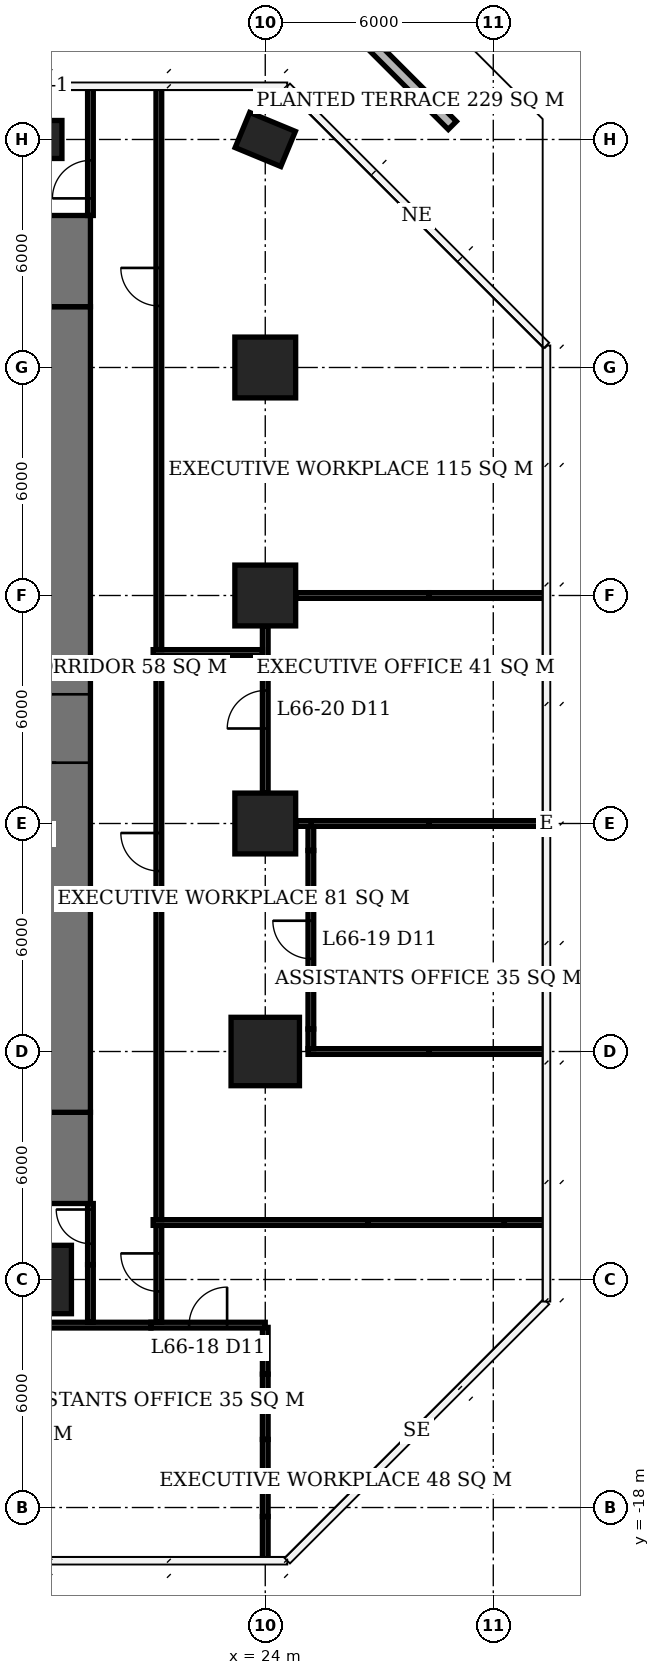
"""IFC4 building model, lengths in metres.
Left out: names, types, materials, properties, quantities, classifications, styles, units other than length and angle.
Written with IfcOpenShell. Run it as: python <this file> out.ifc"""

import sys

from ifc_helpers import new_model, si_unit, direction, frame, frame_2d, origin, origin_2d, place, context, subcontext, project, spatial, rectangle, extrude, element, fill, save


model = new_model("IFC4")
c1 = context("Model", 3, precision=1e-05, world=origin(), true_north=direction((0.0, 1.0)))
c2 = subcontext(c1, "Body", "Model", "MODEL_VIEW")
j1 = project(units=[si_unit("LENGTHUNIT", "METRE"), si_unit("PLANEANGLEUNIT", "RADIAN")], contexts=[c1])
p1 = place(None, origin())
s1 = spatial("IfcSite", under=j1, at=p1, CompositionType="ELEMENT")
p2 = place(p1, origin())
s2 = spatial("IfcBuilding", under=s1, at=p2, CompositionType="ELEMENT")
p3 = place(p2, frame((0.0, 0.0, 268.4)))
s3 = spatial("IfcBuildingStorey", under=s2, at=p3, CompositionType="ELEMENT", Elevation=268.4)
p4 = place(p3, frame((18.0, -12.0, 0.0), z_axis=(0.0, 0.0, 1.0), x_axis=(1.0, 0.0, 0.0)))
e1 = element("IfcColumn", 1, at=p4, inside=s3, PredefinedType="COLUMN", context=c2, shape_type="SweptSolid", body=[
    extrude(rectangle(XDim=1.8, YDim=1.8, at=origin_2d()), origin(), (0.0, 0.0, 1.0), 3.9),
])
p5 = place(p3, frame((18.0, 18.0, 0.0), z_axis=(0.0, 0.0, 1.0), x_axis=(1.0, 0.0, 0.0)))
e2 = element("IfcColumn", 2, at=p5, inside=s3, PredefinedType="COLUMN", context=c2, shape_type="SweptSolid", body=[
    extrude(rectangle(XDim=1.3, YDim=1.0, at=origin_2d()), origin(), (0.0, 0.0, 1.0), 3.9),
])
p6 = place(p3, frame((24.0, -6.0, 0.0), z_axis=(0.0, 0.0, 1.0), x_axis=(1.0, 0.0, 0.0)))
e3 = element("IfcColumn", 3, at=p6, inside=s3, PredefinedType="COLUMN", context=c2, shape_type="SweptSolid", body=[
    extrude(rectangle(XDim=1.8, YDim=1.8, at=origin_2d()), origin(), (0.0, 0.0, 1.0), 3.9),
])
for number, where, z_axis, x_axis in (
    (4, (24.0, 0.0, 0.0), (0.0, 0.0, 1.0), (1.0, 0.0, 0.0)),
    (5, (24.0, 6.0, 0.0), (0.0, 0.0, 1.0), (1.0, 0.0, 0.0)),
    (6, (24.0, 12.0, 0.0), (0.0, 0.0, 1.0), (1.0, 0.0, 0.0)),
):
    element("IfcColumn", number, at=place(p3, frame(where, z_axis=z_axis, x_axis=x_axis)), inside=s3, PredefinedType="COLUMN", context=c2, shape_type="SweptSolid", body=[
        extrude(rectangle(XDim=1.6, YDim=1.6, at=origin_2d()), origin(), (0.0, 0.0, 1.0), 3.9),
    ])
p7 = place(p3, frame((24.0, 18.0, 0.0), z_axis=(0.0, 0.0, 1.0), x_axis=(0.923879532511, -0.382683432365, 0.0)))
e7 = element("IfcColumn", 7, at=p7, inside=s3, PredefinedType="COLUMN", context=c2, shape_type="SweptSolid", body=[
    extrude(rectangle(XDim=1.3, YDim=1.0, at=origin_2d()), origin(), (0.0, 0.0, 1.0), 3.9),
])
p8 = place(p3, frame((18.5, -7.6, 0.0), z_axis=(0.0, 0.0, 1.0), x_axis=(0.0, 1.0, 0.0)))
e8 = element("IfcWall", 8, at=p8, inside=s3, PredefinedType="SHEAR", context=c2, shape_type="SweptSolid", body=[
    extrude(rectangle(XDim=21.2, YDim=1.8, at=frame_2d((10.6, 0.0))), origin(), (0.0, 0.0, 1.0), 3.9),
])
p9 = place(p8, frame((9.2, 0.0, 0.0)))
e9 = element("IfcOpeningElement", 9, at=p9, cuts=e8, PredefinedType="OPENING", context=c2, shape_type="SweptSolid", body=[
    extrude(rectangle(XDim=1.8, YDim=2.4, at=frame_2d((0.9, 1.2))), frame((0.0, 0.91, 0.0), z_axis=(0.0, -1.0, 0.0), x_axis=(1.0, 0.0, 0.0)), (0.0, 0.0, 1.0), 1.82),
])
for number, where, z_axis, x_axis in (
    (10, (18.5, -10.0, 0.0), (0.0, 0.0, 1.0), (0.0, 1.0, 0.0)),
    (11, (18.5, 13.6, 0.0), (0.0, 0.0, 1.0), (0.0, 1.0, 0.0)),
):
    element("IfcWall", number, at=place(p3, frame(where, z_axis=z_axis, x_axis=x_axis)), inside=s3, PredefinedType="SHEAR", context=c2, shape_type="SweptSolid", body=[
        extrude(rectangle(XDim=2.4, YDim=1.8, at=frame_2d((1.2, 0.0))), origin(), (0.0, 0.0, 1.0), 3.9),
    ])
p10 = place(p3, frame((24.37, 22.923, 0.0), z_axis=(0.0, 0.0, 1.0), x_axis=(0.707106781187, -0.707106781187, 0.0)))
e12 = element("IfcWall", 12, at=p10, inside=s3, PredefinedType="USERDEFINED", context=c2, shape_type="SweptSolid", body=[
    extrude(rectangle(XDim=6.438, YDim=0.3, at=frame_2d((3.219, 0.0))), origin(), (0.0, 0.0, 1.0), 0.6),
])
p11 = place(p3, frame((17.925, -13.2, 0.0), z_axis=(0.0, 0.0, 1.0), x_axis=(1.0, 0.0, 0.0)))
e13 = element("IfcWall", 13, at=p11, inside=s3, PredefinedType="PARTITIONING", context=c2, shape_type="SweptSolid", body=[
    extrude(rectangle(XDim=3.067, YDim=0.15, at=frame_2d((1.534, 0.0))), origin(), (0.0, 0.0, 1.0), 2.65),
])
p12 = place(p3, frame((20.992, -13.2, 0.0), z_axis=(0.0, 0.0, 1.0), x_axis=(1.0, 0.0, 0.0)))
e14 = element("IfcWall", 14, at=p12, inside=s3, PredefinedType="PARTITIONING", context=c2, shape_type="SweptSolid", body=[
    extrude(rectangle(XDim=3.008, YDim=0.15, at=frame_2d((1.504, 0.0))), origin(), (0.0, 0.0, 1.0), 3.65),
])
p13 = place(p12, frame((1.004, 0.0, 0.0)))
e15 = element("IfcOpeningElement", 15, at=p13, cuts=e14, PredefinedType="OPENING", context=c2, shape_type="SweptSolid", body=[
    extrude(rectangle(XDim=1.0, YDim=2.4, at=frame_2d((0.5, 1.2))), frame((0.0, 0.085, 0.0), z_axis=(0.0, -1.0, 0.0), x_axis=(1.0, 0.0, 0.0)), (0.0, 0.0, 1.0), 0.17),
])
p14 = place(p3, frame((25.125, -6.0, 0.0), z_axis=(0.0, 0.0, 1.0), x_axis=(1.0, 0.0, 0.0)))
e16 = element("IfcWall", 16, at=p14, inside=s3, PredefinedType="PARTITIONING", context=c2, shape_type="SweptSolid", body=[
    extrude(rectangle(XDim=3.185, YDim=0.15, at=frame_2d((1.593, 0.0))), origin(), (0.0, 0.0, 1.0), 2.65),
])
p15 = place(p3, frame((28.31, -6.0, 0.0), z_axis=(0.0, 0.0, 1.0), x_axis=(1.0, 0.0, 0.0)))
e17 = element("IfcWall", 17, at=p15, inside=s3, PredefinedType="PARTITIONING", context=c2, shape_type="SweptSolid", body=[
    extrude(rectangle(XDim=3.065, YDim=0.15, at=frame_2d((1.532, 0.0))), origin(), (0.0, 0.0, 1.0), 3.65),
])
p16 = place(p3, frame((24.8, 0.0, 0.0), z_axis=(0.0, 0.0, 1.0), x_axis=(1.0, 0.0, 0.0)))
e18 = element("IfcWall", 18, at=p16, inside=s3, PredefinedType="PARTITIONING", context=c2, shape_type="SweptSolid", body=[
    extrude(rectangle(XDim=0.475, YDim=0.15, at=frame_2d((0.237, 0.0))), origin(), (0.0, 0.0, 1.0), 2.65),
])
p17 = place(p3, frame((25.2, 0.0, 0.0), z_axis=(0.0, 0.0, 1.0), x_axis=(1.0, 0.0, 0.0)))
e19 = element("IfcWall", 19, at=p17, inside=s3, PredefinedType="PARTITIONING", context=c2, shape_type="SweptSolid", body=[
    extrude(rectangle(XDim=3.11, YDim=0.15, at=frame_2d((1.555, 0.0))), origin(), (0.0, 0.0, 1.0), 2.65),
])
p18 = place(p3, frame((28.31, 0.0, 0.0), z_axis=(0.0, 0.0, 1.0), x_axis=(1.0, 0.0, 0.0)))
e20 = element("IfcWall", 20, at=p18, inside=s3, PredefinedType="PARTITIONING", context=c2, shape_type="SweptSolid", body=[
    extrude(rectangle(XDim=3.04, YDim=0.15, at=frame_2d((1.52, 0.0))), origin(), (0.0, 0.0, 1.0), 3.65),
])
p19 = place(p3, frame((24.8, 6.0, 0.0), z_axis=(0.0, 0.0, 1.0), x_axis=(1.0, 0.0, 0.0)))
e21 = element("IfcWall", 21, at=p19, inside=s3, PredefinedType="PARTITIONING", context=c2, shape_type="SweptSolid", body=[
    extrude(rectangle(XDim=3.51, YDim=0.15, at=frame_2d((1.755, 0.0))), origin(), (0.0, 0.0, 1.0), 2.65),
])
p20 = place(p3, frame((28.31, 6.0, 0.0), z_axis=(0.0, 0.0, 1.0), x_axis=(1.0, 0.0, 0.0)))
e22 = element("IfcWall", 22, at=p20, inside=s3, PredefinedType="PARTITIONING", context=c2, shape_type="SweptSolid", body=[
    extrude(rectangle(XDim=3.065, YDim=0.15, at=frame_2d((1.532, 0.0))), origin(), (0.0, 0.0, 1.0), 3.65),
])
p21 = place(p3, frame((24.0, -19.375, 0.0), z_axis=(0.0, 0.0, 1.0), x_axis=(0.0, 1.0, 0.0)))
e23 = element("IfcWall", 23, at=p21, inside=s3, PredefinedType="PARTITIONING", context=c2, shape_type="SweptSolid", body=[
    extrude(rectangle(XDim=1.138, YDim=0.15, at=frame_2d((0.569, 0.0))), origin(), (0.0, 0.0, 1.0), 3.65),
])
p22 = place(p3, frame((24.0, -18.237, 0.0), z_axis=(0.0, 0.0, 1.0), x_axis=(0.0, 1.0, 0.0)))
e24 = element("IfcWall", 24, at=p22, inside=s3, PredefinedType="PARTITIONING", context=c2, shape_type="SweptSolid", body=[
    extrude(rectangle(XDim=2.029, YDim=0.15, at=frame_2d((1.015, 0.0))), origin(), (0.0, 0.0, 1.0), 2.65),
])
p23 = place(p3, frame((24.0, -16.208, 0.0), z_axis=(0.0, 0.0, 1.0), x_axis=(0.0, 1.0, 0.0)))
e25 = element("IfcWall", 25, at=p23, inside=s3, PredefinedType="PARTITIONING", context=c2, shape_type="SweptSolid", body=[
    extrude(rectangle(XDim=1.718, YDim=0.15, at=frame_2d((0.859, 0.0))), origin(), (0.0, 0.0, 1.0), 3.65),
])
p24 = place(p3, frame((24.0, -14.49, 0.0), z_axis=(0.0, 0.0, 1.0), x_axis=(0.0, 1.0, 0.0)))
e26 = element("IfcWall", 26, at=p24, inside=s3, PredefinedType="PARTITIONING", context=c2, shape_type="SweptSolid", body=[
    extrude(rectangle(XDim=1.23, YDim=0.15, at=frame_2d((0.615, 0.0))), origin(), (0.0, 0.0, 1.0), 2.65),
])
p25 = place(p3, frame((24.0, 0.8, 0.0), z_axis=(0.0, 0.0, 1.0), x_axis=(0.0, 1.0, 0.0)))
e27 = element("IfcWall", 27, at=p25, inside=s3, PredefinedType="PARTITIONING", context=c2, shape_type="SweptSolid", body=[
    extrude(rectangle(XDim=4.4, YDim=0.15, at=frame_2d((2.2, 0.0))), origin(), (0.0, 0.0, 1.0), 3.65),
])
p26 = place(p25, frame((1.7, 0.0, 0.0)))
e28 = element("IfcOpeningElement", 28, at=p26, cuts=e27, PredefinedType="OPENING", context=c2, shape_type="SweptSolid", body=[
    extrude(rectangle(XDim=1.0, YDim=2.4, at=frame_2d((0.5, 1.2))), frame((0.0, 0.085, 0.0), z_axis=(0.0, -1.0, 0.0), x_axis=(1.0, 0.0, 0.0)), (0.0, 0.0, 1.0), 0.17),
])
p27 = place(p3, frame((25.2, -5.925, 0.0), z_axis=(0.0, 0.0, 1.0), x_axis=(0.0, 1.0, 0.0)))
e29 = element("IfcWall", 29, at=p27, inside=s3, PredefinedType="PARTITIONING", context=c2, shape_type="SweptSolid", body=[
    extrude(rectangle(XDim=0.517, YDim=0.15, at=frame_2d((0.259, 0.0))), origin(), (0.0, 0.0, 1.0), 2.65),
])
p28 = place(p3, frame((25.2, -5.408, 0.0), z_axis=(0.0, 0.0, 1.0), x_axis=(0.0, 1.0, 0.0)))
e30 = element("IfcWall", 30, at=p28, inside=s3, PredefinedType="PARTITIONING", context=c2, shape_type="SweptSolid", body=[
    extrude(rectangle(XDim=4.698, YDim=0.15, at=frame_2d((2.349, 0.0))), origin(), (0.0, 0.0, 1.0), 3.65),
])
p29 = place(p28, frame((1.849, 0.0, 0.0)))
e31 = element("IfcOpeningElement", 31, at=p29, cuts=e30, PredefinedType="OPENING", context=c2, shape_type="SweptSolid", body=[
    extrude(rectangle(XDim=1.0, YDim=2.4, at=frame_2d((0.5, 1.2))), frame((0.0, 0.085, 0.0), z_axis=(0.0, -1.0, 0.0), x_axis=(1.0, 0.0, 0.0)), (0.0, 0.0, 1.0), 0.17),
])
p30 = place(p3, frame((25.2, -0.71, 0.0), z_axis=(0.0, 0.0, 1.0), x_axis=(0.0, 1.0, 0.0)))
e32 = element("IfcWall", 32, at=p30, inside=s3, PredefinedType="PARTITIONING", context=c2, shape_type="SweptSolid", body=[
    extrude(rectangle(XDim=0.635, YDim=0.15, at=frame_2d((0.317, 0.0))), origin(), (0.0, 0.0, 1.0), 2.65),
])
p31 = place(p3, frame((19.4, -13.125, 0.0), z_axis=(0.0, 0.0, 1.0), x_axis=(0.0, 1.0, 0.0)))
e33 = element("IfcWall", 33, at=p31, inside=s3, PredefinedType="PARTITIONING", context=c2, shape_type="SweptSolid", body=[
    extrude(rectangle(XDim=1.517, YDim=0.15, at=frame_2d((0.759, 0.0))), origin(), (0.0, 0.0, 1.0), 2.65),
])
p32 = place(p3, frame((19.4, -11.608, 0.0), z_axis=(0.0, 0.0, 1.0), x_axis=(0.0, 1.0, 0.0)))
e34 = element("IfcWall", 34, at=p32, inside=s3, PredefinedType="PARTITIONING", context=c2, shape_type="SweptSolid", body=[
    extrude(rectangle(XDim=1.608, YDim=0.15, at=frame_2d((0.804, 0.0))), origin(), (0.0, 0.0, 1.0), 3.65),
])
p33 = place(p32, frame((0.55, 0.0, 0.0)))
e35 = element("IfcOpeningElement", 35, at=p33, cuts=e34, PredefinedType="OPENING", context=c2, shape_type="SweptSolid", body=[
    extrude(rectangle(XDim=0.9, YDim=2.1, at=frame_2d((0.45, 1.05))), frame((0.0, 0.085, 0.0), z_axis=(0.0, -1.0, 0.0), x_axis=(1.0, 0.0, 0.0)), (0.0, 0.0, 1.0), 0.17),
])
p34 = place(p3, frame((19.4, 16.0, 0.0), z_axis=(0.0, 0.0, 1.0), x_axis=(0.0, 1.0, 0.0)))
e36 = element("IfcWall", 36, at=p34, inside=s3, PredefinedType="PARTITIONING", context=c2, shape_type="SweptSolid", body=[
    extrude(rectangle(XDim=3.375, YDim=0.15, at=frame_2d((1.688, 0.0))), origin(), (0.0, 0.0, 1.0), 3.65),
])
p35 = place(p34, frame((0.45, 0.0, 0.0)))
e37 = element("IfcOpeningElement", 37, at=p35, cuts=e36, PredefinedType="OPENING", context=c2, shape_type="SweptSolid", body=[
    extrude(rectangle(XDim=1.0, YDim=2.1, at=frame_2d((0.5, 1.05))), frame((0.0, 0.085, 0.0), z_axis=(0.0, -1.0, 0.0), x_axis=(1.0, 0.0, 0.0)), (0.0, 0.0, 1.0), 0.17),
])
p36 = place(p3, frame((21.2, -13.125, 0.0), z_axis=(0.0, 0.0, 1.0), x_axis=(0.0, 1.0, 0.0)))
e38 = element("IfcWall", 38, at=p36, inside=s3, PredefinedType="PARTITIONING", context=c2, shape_type="SweptSolid", body=[
    extrude(rectangle(XDim=2.55, YDim=0.15, at=frame_2d((1.275, 0.0))), origin(), (0.0, 0.0, 1.0), 3.65),
])
p37 = place(p36, frame((0.812, 0.0, 0.0)))
e39 = element("IfcOpeningElement", 39, at=p37, cuts=e38, PredefinedType="OPENING", context=c2, shape_type="SweptSolid", body=[
    extrude(rectangle(XDim=1.0, YDim=2.4, at=frame_2d((0.5, 1.2))), frame((0.0, 0.085, 0.0), z_axis=(0.0, -1.0, 0.0), x_axis=(1.0, 0.0, 0.0)), (0.0, 0.0, 1.0), 0.17),
])
p38 = place(p3, frame((21.2, -10.425, 0.0), z_axis=(0.0, 0.0, 1.0), x_axis=(0.0, 1.0, 0.0)))
e40 = element("IfcWall", 40, at=p38, inside=s3, PredefinedType="PARTITIONING", context=c2, shape_type="SweptSolid", body=[
    extrude(rectangle(XDim=14.85, YDim=0.15, at=frame_2d((7.425, 0.0))), origin(), (0.0, 0.0, 1.0), 3.65),
])
p39 = place(p38, frame((9.175, 0.0, 0.0)))
e41 = element("IfcOpeningElement", 41, at=p39, cuts=e40, PredefinedType="OPENING", context=c2, shape_type="SweptSolid", body=[
    extrude(rectangle(XDim=1.0, YDim=2.4, at=frame_2d((0.5, 1.2))), frame((0.0, 0.085, 0.0), z_axis=(0.0, -1.0, 0.0), x_axis=(1.0, 0.0, 0.0)), (0.0, 0.0, 1.0), 0.17),
])
p40 = place(p3, frame((21.05, -10.5, 0.0), z_axis=(0.0, 0.0, 1.0), x_axis=(1.0, 0.0, 0.0)))
e42 = element("IfcWall", 42, at=p40, inside=s3, PredefinedType="PARTITIONING", context=c2, shape_type="SweptSolid", body=[
    extrude(rectangle(XDim=5.658, YDim=0.15, at=frame_2d((2.829, 0.0))), origin(), (0.0, 0.0, 1.0), 3.65),
])
p41 = place(p3, frame((26.708, -10.5, 0.0), z_axis=(0.0, 0.0, 1.0), x_axis=(1.0, 0.0, 0.0)))
e43 = element("IfcWall", 43, at=p41, inside=s3, PredefinedType="PARTITIONING", context=c2, shape_type="SweptSolid", body=[
    extrude(rectangle(XDim=3.584, YDim=0.15, at=frame_2d((1.792, 0.0))), origin(), (0.0, 0.0, 1.0), 2.65),
])
p42 = place(p3, frame((30.292, -10.5, 0.0), z_axis=(0.0, 0.0, 1.0), x_axis=(1.0, 0.0, 0.0)))
e44 = element("IfcWall", 44, at=p42, inside=s3, PredefinedType="PARTITIONING", context=c2, shape_type="SweptSolid", body=[
    extrude(rectangle(XDim=1.083, YDim=0.15, at=frame_2d((0.542, 0.0))), origin(), (0.0, 0.0, 1.0), 3.65),
])
p43 = place(p3, frame((21.2, 4.575, 0.0), z_axis=(0.0, 0.0, 1.0), x_axis=(0.0, 1.0, 0.0)))
e45 = element("IfcWall", 45, at=p43, inside=s3, PredefinedType="PARTITIONING", context=c2, shape_type="SweptSolid", body=[
    extrude(rectangle(XDim=14.8, YDim=0.15, at=frame_2d((7.4, 0.0))), origin(), (0.0, 0.0, 1.0), 3.65),
])
p44 = place(p43, frame((9.045, 0.0, 0.0)))
e46 = element("IfcOpeningElement", 46, at=p44, cuts=e45, PredefinedType="OPENING", context=c2, shape_type="SweptSolid", body=[
    extrude(rectangle(XDim=1.0, YDim=2.4, at=frame_2d((0.5, 1.2))), frame((0.0, 0.085, 0.0), z_axis=(0.0, -1.0, 0.0), x_axis=(1.0, 0.0, 0.0)), (0.0, 0.0, 1.0), 0.17),
])
p45 = place(p3, frame((21.05, 4.5, 0.0), z_axis=(0.0, 0.0, 1.0), x_axis=(1.0, 0.0, 0.0)))
e47 = element("IfcWall", 47, at=p45, inside=s3, PredefinedType="PARTITIONING", context=c2, shape_type="SweptSolid", body=[
    extrude(rectangle(XDim=2.875, YDim=0.15, at=frame_2d((1.438, 0.0))), origin(), (0.0, 0.0, 1.0), 3.65),
])
p46 = place(p9, origin())
e48 = element("IfcDoor", 48, at=p46, inside=s3, OperationType="DOUBLE_DOOR_SINGLE_SWING", PredefinedType="DOOR", context=c2, shape_type="SweptSolid", body=[
    extrude(rectangle(XDim=1.8, YDim=2.4, at=frame_2d((0.9, 1.2))), frame((0.0, 0.025, 0.0), z_axis=(0.0, -1.0, 0.0), x_axis=(1.0, 0.0, 0.0)), (0.0, 0.0, 1.0), 0.05),
])
fill(e9, e48)
p47 = place(p13, origin())
e49 = element("IfcDoor", 49, at=p47, inside=s3, OperationType="SINGLE_SWING_RIGHT", PredefinedType="DOOR", context=c2, shape_type="SweptSolid", body=[
    extrude(rectangle(XDim=1.0, YDim=2.4, at=frame_2d((0.5, 1.2))), frame((0.0, 0.025, 0.0), z_axis=(0.0, -1.0, 0.0), x_axis=(1.0, 0.0, 0.0)), (0.0, 0.0, 1.0), 0.05),
])
fill(e15, e49)
p48 = place(p29, origin())
e50 = element("IfcDoor", 50, at=p48, inside=s3, OperationType="SINGLE_SWING_RIGHT", PredefinedType="DOOR", context=c2, shape_type="SweptSolid", body=[
    extrude(rectangle(XDim=1.0, YDim=2.4, at=frame_2d((0.5, 1.2))), frame((0.0, 0.025, 0.0), z_axis=(0.0, -1.0, 0.0), x_axis=(1.0, 0.0, 0.0)), (0.0, 0.0, 1.0), 0.05),
])
fill(e31, e50)
p49 = place(p26, origin())
e51 = element("IfcDoor", 51, at=p49, inside=s3, OperationType="SINGLE_SWING_LEFT", PredefinedType="DOOR", context=c2, shape_type="SweptSolid", body=[
    extrude(rectangle(XDim=1.0, YDim=2.4, at=frame_2d((0.5, 1.2))), frame((0.0, 0.025, 0.0), z_axis=(0.0, -1.0, 0.0), x_axis=(1.0, 0.0, 0.0)), (0.0, 0.0, 1.0), 0.05),
])
fill(e28, e51)
p50 = place(p37, origin())
e52 = element("IfcDoor", 52, at=p50, inside=s3, OperationType="SINGLE_SWING_RIGHT", PredefinedType="DOOR", context=c2, shape_type="SweptSolid", body=[
    extrude(rectangle(XDim=1.0, YDim=2.4, at=frame_2d((0.5, 1.2))), frame((0.0, 0.025, 0.0), z_axis=(0.0, -1.0, 0.0), x_axis=(1.0, 0.0, 0.0)), (0.0, 0.0, 1.0), 0.05),
])
fill(e39, e52)
p51 = place(p39, origin())
e53 = element("IfcDoor", 53, at=p51, inside=s3, OperationType="SINGLE_SWING_RIGHT", PredefinedType="DOOR", context=c2, shape_type="SweptSolid", body=[
    extrude(rectangle(XDim=1.0, YDim=2.4, at=frame_2d((0.5, 1.2))), frame((0.0, 0.025, 0.0), z_axis=(0.0, -1.0, 0.0), x_axis=(1.0, 0.0, 0.0)), (0.0, 0.0, 1.0), 0.05),
])
fill(e41, e53)
p52 = place(p44, origin())
e54 = element("IfcDoor", 54, at=p52, inside=s3, OperationType="SINGLE_SWING_RIGHT", PredefinedType="DOOR", context=c2, shape_type="SweptSolid", body=[
    extrude(rectangle(XDim=1.0, YDim=2.4, at=frame_2d((0.5, 1.2))), frame((0.0, 0.025, 0.0), z_axis=(0.0, -1.0, 0.0), x_axis=(1.0, 0.0, 0.0)), (0.0, 0.0, 1.0), 0.05),
])
fill(e46, e54)
p53 = place(p35, origin())
e55 = element("IfcDoor", 55, at=p53, inside=s3, OperationType="SINGLE_SWING_LEFT", PredefinedType="DOOR", context=c2, shape_type="SweptSolid", body=[
    extrude(rectangle(XDim=1.0, YDim=2.1, at=frame_2d((0.5, 1.05))), frame((0.0, 0.025, 0.0), z_axis=(0.0, -1.0, 0.0), x_axis=(1.0, 0.0, 0.0)), (0.0, 0.0, 1.0), 0.05),
])
fill(e37, e55)
p54 = place(p33, origin())
e56 = element("IfcDoor", 56, at=p54, inside=s3, OperationType="SINGLE_SWING_RIGHT", PredefinedType="DOOR", context=c2, shape_type="SweptSolid", body=[
    extrude(rectangle(XDim=0.9, YDim=2.1, at=frame_2d((0.45, 1.05))), frame((0.0, 0.025, 0.0), z_axis=(0.0, -1.0, 0.0), x_axis=(1.0, 0.0, 0.0)), (0.0, 0.0, 1.0), 0.05),
])
fill(e35, e56)
save(model, sys.argv[1])
